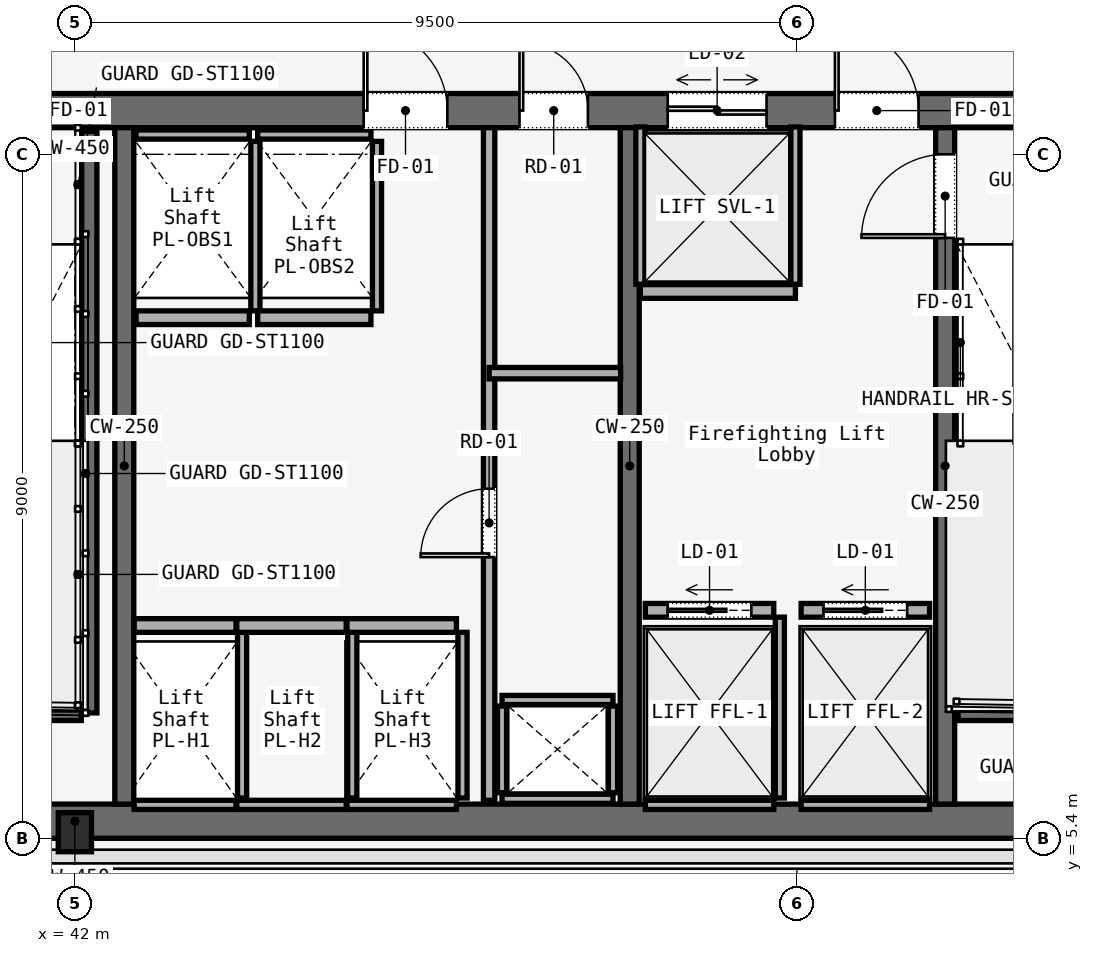
"""IFC4 building model, lengths in metres.
Left out: names, types, materials, properties, quantities, classifications, styles, units other than length and angle.
Written with IfcOpenShell. Run it as: python <this file> out.ifc"""

import sys

from ifc_helpers import new_model, si_unit, direction, frame, frame_2d, origin, origin_2d, place, context, subcontext, project, spatial, rectangle, i_section, extrude, element, fill, save


model = new_model("IFC4")
c1 = context("Model", 3, precision=1e-05, world=origin(), true_north=direction((0.0, 1.0)))
c2 = subcontext(c1, "Body", "Model", "MODEL_VIEW")
j1 = project(units=[si_unit("LENGTHUNIT", "METRE"), si_unit("PLANEANGLEUNIT", "RADIAN")], contexts=[c1])
p1 = place(None, origin())
s1 = spatial("IfcSite", under=j1, at=p1, CompositionType="ELEMENT")
p2 = place(p1, origin())
s2 = spatial("IfcBuilding", under=s1, at=p2, CompositionType="ELEMENT")
p3 = place(p2, frame((0.0, 0.0, 74.0)))
s3 = spatial("IfcBuildingStorey", under=s2, at=p3, CompositionType="ELEMENT", Elevation=74.0)
p4 = place(p3, frame((26.45, 14.975, 0.0), z_axis=(0.0, 0.0, 1.0), x_axis=(1.0, 0.0, 0.0)))
e1 = element("IfcWall", 1, at=p4, inside=s3, PredefinedType="SOLIDWALL", context=c2, shape_type="SweptSolid", body=[
    extrude(rectangle(XDim=31.1, YDim=0.45, at=frame_2d((15.55, 0.0))), origin(), (0.0, 0.0, 1.0), 3.58),
])
p5 = place(p4, frame((1.65, 0.0, 0.0)))
e2 = element("IfcOpeningElement", 2, at=p5, cuts=e1, PredefinedType="OPENING", context=c2, shape_type="SweptSolid", body=[
    extrude(rectangle(XDim=1.1, YDim=2.2, at=frame_2d((0.55, 1.1))), frame((0.0, 0.225, 0.0), z_axis=(0.0, -1.0, 0.0), x_axis=(1.0, 0.0, 0.0)), (0.0, 0.0, 1.0), 0.45),
])
p6 = place(p4, frame((13.65, 0.0, 0.0)))
e3 = element("IfcOpeningElement", 3, at=p6, cuts=e1, PredefinedType="OPENING", context=c2, shape_type="SweptSolid", body=[
    extrude(rectangle(XDim=1.1, YDim=2.2, at=frame_2d((0.55, 1.1))), frame((0.0, 0.225, 0.0), z_axis=(0.0, -1.0, 0.0), x_axis=(1.0, 0.0, 0.0)), (0.0, 0.0, 1.0), 0.45),
])
p7 = place(p4, frame((25.55, 0.0, 0.0)))
e4 = element("IfcOpeningElement", 4, at=p7, cuts=e1, PredefinedType="OPENING", context=c2, shape_type="SweptSolid", body=[
    extrude(rectangle(XDim=1.1, YDim=2.2, at=frame_2d((0.55, 1.1))), frame((0.0, 0.225, 0.0), z_axis=(0.0, -1.0, 0.0), x_axis=(1.0, 0.0, 0.0)), (0.0, 0.0, 1.0), 0.45),
])
p8 = place(p4, frame((10.7, 0.0, 0.0)))
e5 = element("IfcOpeningElement", 5, at=p8, cuts=e1, PredefinedType="OPENING", context=c2, shape_type="SweptSolid", body=[
    extrude(rectangle(XDim=1.4, YDim=2.2, at=frame_2d((0.7, 1.1))), frame((0.0, 0.225, 0.0), z_axis=(0.0, -1.0, 0.0), x_axis=(1.0, 0.0, 0.0)), (0.0, 0.0, 1.0), 0.45),
])
p9 = place(p4, frame((19.35, 0.0, 0.0)))
e6 = element("IfcOpeningElement", 6, at=p9, cuts=e1, PredefinedType="OPENING", context=c2, shape_type="SweptSolid", body=[
    extrude(rectangle(XDim=1.1, YDim=2.2, at=frame_2d((0.55, 1.1))), frame((0.0, 0.225, 0.0), z_axis=(0.0, -1.0, 0.0), x_axis=(1.0, 0.0, 0.0)), (0.0, 0.0, 1.0), 0.45),
])
p10 = place(p4, frame((21.4, 0.0, 0.0)))
e7 = element("IfcOpeningElement", 7, at=p10, cuts=e1, PredefinedType="OPENING", context=c2, shape_type="SweptSolid", body=[
    extrude(rectangle(XDim=0.9, YDim=2.1, at=frame_2d((0.45, 1.05))), frame((0.0, 0.225, 0.0), z_axis=(0.0, -1.0, 0.0), x_axis=(1.0, 0.0, 0.0)), (0.0, 0.0, 1.0), 0.45),
])
p11 = place(p4, frame((23.35, 0.0, 0.0)))
e8 = element("IfcOpeningElement", 8, at=p11, cuts=e1, PredefinedType="OPENING", context=c2, shape_type="SweptSolid", body=[
    extrude(rectangle(XDim=1.3, YDim=2.3, at=frame_2d((0.65, 1.15))), frame((0.0, 0.225, 0.0), z_axis=(0.0, -1.0, 0.0), x_axis=(1.0, 0.0, 0.0)), (0.0, 0.0, 1.0), 0.45),
])
p12 = place(p3, frame((26.45, 5.625, 0.0), z_axis=(0.0, 0.0, 1.0), x_axis=(1.0, 0.0, 0.0)))
e9 = element("IfcWall", 9, at=p12, inside=s3, PredefinedType="SOLIDWALL", context=c2, shape_type="SweptSolid", body=[
    extrude(rectangle(XDim=31.1, YDim=0.45, at=frame_2d((15.55, 0.0))), origin(), (0.0, 0.0, 1.0), 3.58),
])
for number, where, z_axis, x_axis in (
    (10, (42.65, 5.85, 0.0), (0.0, 0.0, 1.0), (0.0, 1.0, 0.0)),
    (11, (49.3, 5.85, 0.0), (0.0, 0.0, 1.0), (0.0, 1.0, 0.0)),
):
    element("IfcWall", number, at=place(p3, frame(where, z_axis=z_axis, x_axis=x_axis)), inside=s3, PredefinedType="SOLIDWALL", context=c2, shape_type="SweptSolid", body=[
        extrude(rectangle(XDim=8.9, YDim=0.25, at=frame_2d((4.45, 0.0))), origin(), (0.0, 0.0, 1.0), 3.58),
    ])
p13 = place(p3, frame((53.45, 5.85, 0.0), z_axis=(0.0, 0.0, 1.0), x_axis=(0.0, 1.0, 0.0)))
e12 = element("IfcWall", 12, at=p13, inside=s3, PredefinedType="SOLIDWALL", context=c2, shape_type="SweptSolid", body=[
    extrude(rectangle(XDim=8.9, YDim=0.25, at=frame_2d((4.45, 0.0))), origin(), (0.0, 0.0, 1.0), 3.58),
])
p14 = place(p13, frame((7.45, 0.0, 0.0)))
e13 = element("IfcOpeningElement", 13, at=p14, cuts=e12, PredefinedType="OPENING", context=c2, shape_type="SweptSolid", body=[
    extrude(rectangle(XDim=1.1, YDim=2.2, at=frame_2d((0.55, 1.1))), frame((0.0, 0.125, 0.0), z_axis=(0.0, -1.0, 0.0), x_axis=(1.0, 0.0, 0.0)), (0.0, 0.0, 1.0), 0.25),
])
p15 = place(p3, frame((42.0, 5.48, 0.0), z_axis=(0.0, 0.0, 1.0), x_axis=(1.0, 0.0, 0.0)))
e14 = element("IfcColumn", 14, at=p15, inside=s3, PredefinedType="COLUMN", context=c2, shape_type="SweptSolid", body=[
    extrude(i_section(OverallWidth=0.437, OverallDepth=0.514, WebThickness=0.061, FlangeThickness=0.077, FilletRadius=0.015, at=origin_2d()), origin(), (0.0, 0.0, 1.0), 3.58),
])
p16 = place(p3, frame((42.19, 14.7, 0.0), z_axis=(0.0, 0.0, 1.0), x_axis=(0.0, -1.0, 0.0)))
e15 = element("IfcWall", 15, at=p16, inside=s3, PredefinedType="SOLIDWALL", context=c2, shape_type="SweptSolid", body=[
    extrude(rectangle(XDim=7.65, YDim=0.2, at=frame_2d((3.825, 0.0))), origin(), (0.0, 0.0, 1.0), 3.8),
])
for number, where, z_axis, x_axis in (
    (16, (38.97, 7.05, 0.0), (0.0, 0.0, 1.0), (1.0, 0.0, 0.0)),
    (17, (53.62, 7.05, 0.0), (0.0, 0.0, 1.0), (1.0, 0.0, 0.0)),
):
    element("IfcWall", number, at=place(p3, frame(where, z_axis=z_axis, x_axis=x_axis)), inside=s3, PredefinedType="SOLIDWALL", context=c2, shape_type="SweptSolid", body=[
        extrude(rectangle(XDim=3.115, YDim=0.2, at=frame_2d((1.558, 0.0))), origin(), (0.0, 0.0, 1.0), 3.8),
    ])
for number, where, z_axis, x_axis in (
    (18, (47.62, 5.92, 0.0), (0.0, 0.0, 1.0), (1.0, 0.0, 0.0)),
    (19, (47.62, 7.22, 0.0), (0.0, 0.0, 1.0), (1.0, 0.0, 0.0)),
):
    element("IfcWall", number, at=place(p3, frame(where, z_axis=z_axis, x_axis=x_axis)), inside=s3, PredefinedType="SOLIDWALL", context=c2, shape_type="SweptSolid", body=[
        extrude(rectangle(XDim=1.46, YDim=0.12, at=frame_2d((0.73, 0.0))), origin(), (0.0, 0.0, 1.0), 2.95),
    ])
for number, where, z_axis, x_axis in (
    (20, (47.62, 6.0, 0.0), (0.0, 0.0, 1.0), (0.0, 1.0, 0.0)),
    (21, (49.08, 6.0, 0.0), (0.0, 0.0, 1.0), (0.0, 1.0, 0.0)),
):
    element("IfcWall", number, at=place(p3, frame(where, z_axis=z_axis, x_axis=x_axis)), inside=s3, PredefinedType="SOLIDWALL", context=c2, shape_type="SweptSolid", body=[
        extrude(rectangle(XDim=1.14, YDim=0.12, at=frame_2d((0.57, 0.0))), origin(), (0.0, 0.0, 1.0), 2.95),
    ])
p17 = place(p3, frame((47.45, 5.9, 0.0), z_axis=(0.0, 0.0, 1.0), x_axis=(0.0, 1.0, 0.0)))
e22 = element("IfcWall", 22, at=p17, inside=s3, PredefinedType="PARTITIONING", context=c2, shape_type="SweptSolid", body=[
    extrude(rectangle(XDim=8.85, YDim=0.15, at=frame_2d((4.425, 0.0))), origin(), (0.0, 0.0, 1.0), 2.95),
])
p18 = place(p17, frame((3.2, 0.0, 0.0)))
e23 = element("IfcOpeningElement", 23, at=p18, cuts=e22, PredefinedType="OPENING", context=c2, shape_type="SweptSolid", body=[
    extrude(rectangle(XDim=0.9, YDim=2.1, at=frame_2d((0.45, 1.05))), frame((0.0, 0.075, 0.0), z_axis=(0.0, -1.0, 0.0), x_axis=(1.0, 0.0, 0.0)), (0.0, 0.0, 1.0), 0.15),
])
p19 = place(p3, frame((47.45, 11.52, 0.0), z_axis=(0.0, 0.0, 1.0), x_axis=(1.0, 0.0, 0.0)))
e24 = element("IfcWall", 24, at=p19, inside=s3, PredefinedType="PARTITIONING", context=c2, shape_type="SweptSolid", body=[
    extrude(rectangle(XDim=1.73, YDim=0.15, at=frame_2d((0.865, 0.0))), origin(), (0.0, 0.0, 1.0), 2.95),
])
p20 = place(p3, frame((42.78, 8.2, 0.0), z_axis=(0.0, 0.0, 1.0), x_axis=(1.0, 0.0, 0.0)))
e25 = element("IfcWall", 25, at=p20, inside=s3, PredefinedType="SOLIDWALL", context=c2, shape_type="SweptSolid", body=[
    extrude(rectangle(XDim=1.34, YDim=0.18, at=frame_2d((0.67, 0.0))), origin(), (0.0, 0.0, 1.0), 2.95),
])
p21 = place(p3, frame((42.78, 5.84, 0.0), z_axis=(0.0, 0.0, 1.0), x_axis=(1.0, 0.0, 0.0)))
e26 = element("IfcWall", 26, at=p21, inside=s3, PredefinedType="SOLIDWALL", context=c2, shape_type="SweptSolid", body=[
    extrude(rectangle(XDim=1.34, YDim=0.12, at=frame_2d((0.67, 0.0))), origin(), (0.0, 0.0, 1.0), 2.95),
])
p22 = place(p3, frame((44.2, 5.93, 0.0), z_axis=(0.0, 0.0, 1.0), x_axis=(0.0, 1.0, 0.0)))
e27 = element("IfcWall", 27, at=p22, inside=s3, PredefinedType="SOLIDWALL", context=c2, shape_type="SweptSolid", body=[
    extrude(rectangle(XDim=2.18, YDim=0.12, at=frame_2d((1.09, 0.0))), origin(), (0.0, 0.0, 1.0), 2.95),
])
p23 = place(p3, frame((44.13, 8.2, 0.0), z_axis=(0.0, 0.0, 1.0), x_axis=(1.0, 0.0, 0.0)))
e28 = element("IfcWall", 28, at=p23, inside=s3, PredefinedType="SOLIDWALL", context=c2, shape_type="SweptSolid", body=[
    extrude(rectangle(XDim=1.44, YDim=0.18, at=frame_2d((0.72, 0.0))), origin(), (0.0, 0.0, 1.0), 2.95),
])
p24 = place(p3, frame((44.13, 5.84, 0.0), z_axis=(0.0, 0.0, 1.0), x_axis=(1.0, 0.0, 0.0)))
e29 = element("IfcWall", 29, at=p24, inside=s3, PredefinedType="SOLIDWALL", context=c2, shape_type="SweptSolid", body=[
    extrude(rectangle(XDim=1.44, YDim=0.12, at=frame_2d((0.72, 0.0))), origin(), (0.0, 0.0, 1.0), 2.95),
])
p25 = place(p3, frame((45.65, 5.93, 0.0), z_axis=(0.0, 0.0, 1.0), x_axis=(0.0, 1.0, 0.0)))
e30 = element("IfcWall", 30, at=p25, inside=s3, PredefinedType="SOLIDWALL", context=c2, shape_type="SweptSolid", body=[
    extrude(rectangle(XDim=2.18, YDim=0.12, at=frame_2d((1.09, 0.0))), origin(), (0.0, 0.0, 1.0), 2.95),
])
p26 = place(p3, frame((45.58, 8.2, 0.0), z_axis=(0.0, 0.0, 1.0), x_axis=(1.0, 0.0, 0.0)))
e31 = element("IfcWall", 31, at=p26, inside=s3, PredefinedType="SOLIDWALL", context=c2, shape_type="SweptSolid", body=[
    extrude(rectangle(XDim=1.44, YDim=0.18, at=frame_2d((0.72, 0.0))), origin(), (0.0, 0.0, 1.0), 2.95),
])
p27 = place(p3, frame((45.58, 5.84, 0.0), z_axis=(0.0, 0.0, 1.0), x_axis=(1.0, 0.0, 0.0)))
e32 = element("IfcWall", 32, at=p27, inside=s3, PredefinedType="SOLIDWALL", context=c2, shape_type="SweptSolid", body=[
    extrude(rectangle(XDim=1.44, YDim=0.12, at=frame_2d((0.72, 0.0))), origin(), (0.0, 0.0, 1.0), 2.95),
])
p28 = place(p3, frame((47.1, 5.93, 0.0), z_axis=(0.0, 0.0, 1.0), x_axis=(0.0, 1.0, 0.0)))
e33 = element("IfcWall", 33, at=p28, inside=s3, PredefinedType="SOLIDWALL", context=c2, shape_type="SweptSolid", body=[
    extrude(rectangle(XDim=2.18, YDim=0.12, at=frame_2d((1.09, 0.0))), origin(), (0.0, 0.0, 1.0), 2.95),
])
p29 = place(p3, frame((42.805, 12.25, 0.0), z_axis=(0.0, 0.0, 1.0), x_axis=(1.0, 0.0, 0.0)))
e34 = element("IfcWall", 34, at=p29, inside=s3, PredefinedType="SOLIDWALL", context=c2, shape_type="SweptSolid", body=[
    extrude(rectangle(XDim=1.49, YDim=0.18, at=frame_2d((0.745, 0.0))), origin(), (0.0, 0.0, 1.0), 2.95),
])
p30 = place(p3, frame((42.805, 14.66, 0.0), z_axis=(0.0, 0.0, 1.0), x_axis=(1.0, 0.0, 0.0)))
e35 = element("IfcWall", 35, at=p30, inside=s3, PredefinedType="SOLIDWALL", context=c2, shape_type="SweptSolid", body=[
    extrude(rectangle(XDim=1.49, YDim=0.12, at=frame_2d((0.745, 0.0))), origin(), (0.0, 0.0, 1.0), 2.95),
])
p31 = place(p3, frame((44.375, 12.34, 0.0), z_axis=(0.0, 0.0, 1.0), x_axis=(0.0, 1.0, 0.0)))
e36 = element("IfcWall", 36, at=p31, inside=s3, PredefinedType="SOLIDWALL", context=c2, shape_type="SweptSolid", body=[
    extrude(rectangle(XDim=2.23, YDim=0.12, at=frame_2d((1.115, 0.0))), origin(), (0.0, 0.0, 1.0), 2.95),
])
p32 = place(p3, frame((44.405, 12.25, 0.0), z_axis=(0.0, 0.0, 1.0), x_axis=(1.0, 0.0, 0.0)))
e37 = element("IfcWall", 37, at=p32, inside=s3, PredefinedType="SOLIDWALL", context=c2, shape_type="SweptSolid", body=[
    extrude(rectangle(XDim=1.49, YDim=0.18, at=frame_2d((0.745, 0.0))), origin(), (0.0, 0.0, 1.0), 2.95),
])
p33 = place(p3, frame((44.405, 14.66, 0.0), z_axis=(0.0, 0.0, 1.0), x_axis=(1.0, 0.0, 0.0)))
e38 = element("IfcWall", 38, at=p33, inside=s3, PredefinedType="SOLIDWALL", context=c2, shape_type="SweptSolid", body=[
    extrude(rectangle(XDim=1.49, YDim=0.12, at=frame_2d((0.745, 0.0))), origin(), (0.0, 0.0, 1.0), 2.95),
])
p34 = place(p3, frame((45.975, 12.34, 0.0), z_axis=(0.0, 0.0, 1.0), x_axis=(0.0, 1.0, 0.0)))
e39 = element("IfcWall", 39, at=p34, inside=s3, PredefinedType="SOLIDWALL", context=c2, shape_type="SweptSolid", body=[
    extrude(rectangle(XDim=2.23, YDim=0.12, at=frame_2d((1.115, 0.0))), origin(), (0.0, 0.0, 1.0), 2.95),
])
p35 = place(p3, frame((49.505, 8.4, 0.0), z_axis=(0.0, 0.0, 1.0), x_axis=(1.0, 0.0, 0.0)))
e40 = element("IfcWall", 40, at=p35, inside=s3, PredefinedType="SOLIDWALL", context=c2, shape_type="SweptSolid", body=[
    extrude(rectangle(XDim=1.69, YDim=0.18, at=frame_2d((0.845, 0.0))), origin(), (0.0, 0.0, 1.0), 2.95),
])
p36 = place(p35, frame((0.295, 0.0, 0.0)))
e41 = element("IfcOpeningElement", 41, at=p36, cuts=e40, PredefinedType="OPENING", context=c2, shape_type="SweptSolid", body=[
    extrude(rectangle(XDim=1.1, YDim=2.2, at=frame_2d((0.55, 1.1))), frame((0.0, 0.09, 0.0), z_axis=(0.0, -1.0, 0.0), x_axis=(1.0, 0.0, 0.0)), (0.0, 0.0, 1.0), 0.18),
])
p37 = place(p3, frame((49.505, 5.84, 0.0), z_axis=(0.0, 0.0, 1.0), x_axis=(1.0, 0.0, 0.0)))
e42 = element("IfcWall", 42, at=p37, inside=s3, PredefinedType="SOLIDWALL", context=c2, shape_type="SweptSolid", body=[
    extrude(rectangle(XDim=1.69, YDim=0.12, at=frame_2d((0.845, 0.0))), origin(), (0.0, 0.0, 1.0), 2.95),
])
p38 = place(p3, frame((51.275, 5.93, 0.0), z_axis=(0.0, 0.0, 1.0), x_axis=(0.0, 1.0, 0.0)))
e43 = element("IfcWall", 43, at=p38, inside=s3, PredefinedType="SOLIDWALL", context=c2, shape_type="SweptSolid", body=[
    extrude(rectangle(XDim=2.38, YDim=0.12, at=frame_2d((1.19, 0.0))), origin(), (0.0, 0.0, 1.0), 2.95),
])
p39 = place(p3, frame((51.555, 8.4, 0.0), z_axis=(0.0, 0.0, 1.0), x_axis=(1.0, 0.0, 0.0)))
e44 = element("IfcWall", 44, at=p39, inside=s3, PredefinedType="SOLIDWALL", context=c2, shape_type="SweptSolid", body=[
    extrude(rectangle(XDim=1.69, YDim=0.18, at=frame_2d((0.845, 0.0))), origin(), (0.0, 0.0, 1.0), 2.95),
])
p40 = place(p39, frame((0.295, 0.0, 0.0)))
e45 = element("IfcOpeningElement", 45, at=p40, cuts=e44, PredefinedType="OPENING", context=c2, shape_type="SweptSolid", body=[
    extrude(rectangle(XDim=1.1, YDim=2.2, at=frame_2d((0.55, 1.1))), frame((0.0, 0.09, 0.0), z_axis=(0.0, -1.0, 0.0), x_axis=(1.0, 0.0, 0.0)), (0.0, 0.0, 1.0), 0.18),
])
p41 = place(p3, frame((51.555, 5.84, 0.0), z_axis=(0.0, 0.0, 1.0), x_axis=(1.0, 0.0, 0.0)))
e46 = element("IfcWall", 46, at=p41, inside=s3, PredefinedType="SOLIDWALL", context=c2, shape_type="SweptSolid", body=[
    extrude(rectangle(XDim=1.69, YDim=0.12, at=frame_2d((0.845, 0.0))), origin(), (0.0, 0.0, 1.0), 2.95),
])
p42 = place(p3, frame((49.44, 12.595, 0.0), z_axis=(0.0, 0.0, 1.0), x_axis=(1.0, 0.0, 0.0)))
e47 = element("IfcWall", 47, at=p42, inside=s3, PredefinedType="SOLIDWALL", context=c2, shape_type="SweptSolid", body=[
    extrude(rectangle(XDim=2.04, YDim=0.18, at=frame_2d((1.02, 0.0))), origin(), (0.0, 0.0, 1.0), 2.95),
])
for number, where, z_axis, x_axis in (
    (48, (49.44, 12.69, 0.0), (0.0, 0.0, 1.0), (0.0, 1.0, 0.0)),
    (49, (51.48, 12.69, 0.0), (0.0, 0.0, 1.0), (0.0, 1.0, 0.0)),
):
    element("IfcWall", number, at=place(p3, frame(where, z_axis=z_axis, x_axis=x_axis)), inside=s3, PredefinedType="SOLIDWALL", context=c2, shape_type="SweptSolid", body=[
        extrude(rectangle(XDim=2.07, YDim=0.12, at=frame_2d((1.035, 0.0))), origin(), (0.0, 0.0, 1.0), 2.95),
    ])
p43 = place(p7, origin())
e50 = element("IfcDoor", 50, at=p43, inside=s3, OperationType="SINGLE_SWING_RIGHT", PredefinedType="DOOR", context=c2, shape_type="SweptSolid", body=[
    extrude(rectangle(XDim=1.1, YDim=2.2, at=frame_2d((0.55, 1.1))), frame((0.0, 0.025, 0.0), z_axis=(0.0, -1.0, 0.0), x_axis=(1.0, 0.0, 0.0)), (0.0, 0.0, 1.0), 0.05),
])
fill(e4, e50)
p44 = place(p9, origin())
e51 = element("IfcDoor", 51, at=p44, inside=s3, OperationType="SINGLE_SWING_LEFT", PredefinedType="DOOR", context=c2, shape_type="SweptSolid", body=[
    extrude(rectangle(XDim=1.1, YDim=2.2, at=frame_2d((0.55, 1.1))), frame((0.0, 0.025, 0.0), z_axis=(0.0, -1.0, 0.0), x_axis=(1.0, 0.0, 0.0)), (0.0, 0.0, 1.0), 0.05),
])
fill(e6, e51)
p45 = place(p10, origin())
e52 = element("IfcDoor", 52, at=p45, inside=s3, OperationType="SINGLE_SWING_LEFT", PredefinedType="DOOR", context=c2, shape_type="SweptSolid", body=[
    extrude(rectangle(XDim=0.9, YDim=2.1, at=frame_2d((0.45, 1.05))), frame((0.0, 0.025, 0.0), z_axis=(0.0, -1.0, 0.0), x_axis=(1.0, 0.0, 0.0)), (0.0, 0.0, 1.0), 0.05),
])
fill(e7, e52)
p46 = place(p14, origin())
e53 = element("IfcDoor", 53, at=p46, inside=s3, OperationType="SINGLE_SWING_LEFT", PredefinedType="DOOR", context=c2, shape_type="SweptSolid", body=[
    extrude(rectangle(XDim=1.1, YDim=2.2, at=frame_2d((0.55, 1.1))), frame((0.0, 0.025, 0.0), z_axis=(0.0, -1.0, 0.0), x_axis=(1.0, 0.0, 0.0)), (0.0, 0.0, 1.0), 0.05),
])
fill(e13, e53)
p47 = place(p18, origin())
e54 = element("IfcDoor", 54, at=p47, inside=s3, OperationType="SINGLE_SWING_LEFT", PredefinedType="DOOR", context=c2, shape_type="SweptSolid", body=[
    extrude(rectangle(XDim=0.9, YDim=2.1, at=frame_2d((0.45, 1.05))), frame((0.0, 0.025, 0.0), z_axis=(0.0, -1.0, 0.0), x_axis=(1.0, 0.0, 0.0)), (0.0, 0.0, 1.0), 0.05),
])
fill(e23, e54)
p48 = place(p36, origin())
e55 = element("IfcDoor", 55, at=p48, inside=s3, OperationType="SLIDING_TO_LEFT", PredefinedType="DOOR", context=c2, shape_type="SweptSolid", body=[
    extrude(rectangle(XDim=1.1, YDim=2.2, at=frame_2d((0.55, 1.1))), frame((0.0, 0.025, 0.0), z_axis=(0.0, -1.0, 0.0), x_axis=(1.0, 0.0, 0.0)), (0.0, 0.0, 1.0), 0.05),
])
fill(e41, e55)
p49 = place(p40, origin())
e56 = element("IfcDoor", 56, at=p49, inside=s3, OperationType="SLIDING_TO_LEFT", PredefinedType="DOOR", context=c2, shape_type="SweptSolid", body=[
    extrude(rectangle(XDim=1.1, YDim=2.2, at=frame_2d((0.55, 1.1))), frame((0.0, 0.025, 0.0), z_axis=(0.0, -1.0, 0.0), x_axis=(1.0, 0.0, 0.0)), (0.0, 0.0, 1.0), 0.05),
])
fill(e45, e56)
p50 = place(p11, origin())
e57 = element("IfcDoor", 57, at=p50, inside=s3, OperationType="DOUBLE_DOOR_SLIDING", PredefinedType="DOOR", context=c2, shape_type="SweptSolid", body=[
    extrude(rectangle(XDim=1.3, YDim=2.3, at=frame_2d((0.65, 1.15))), frame((0.0, 0.025, 0.0), z_axis=(0.0, -1.0, 0.0), x_axis=(1.0, 0.0, 0.0)), (0.0, 0.0, 1.0), 0.05),
])
fill(e8, e57)
save(model, sys.argv[1])
